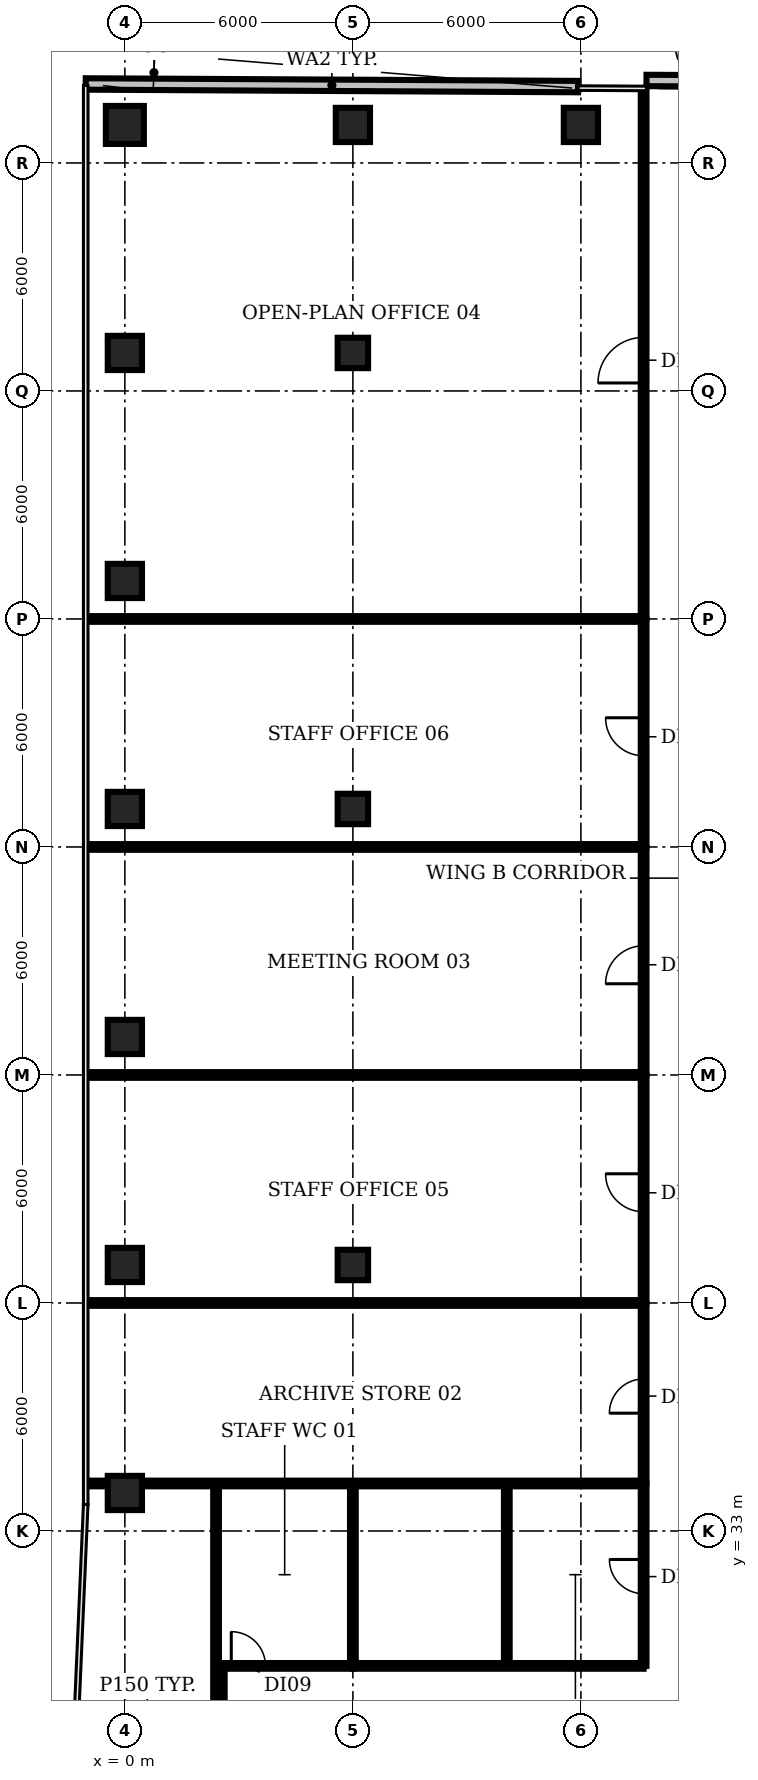
"""IFC4 building model, lengths in metres.
Left out: names, types, materials, properties, quantities, classifications, styles, units other than length and angle.
Written with IfcOpenShell. Run it as: python <this file> out.ifc"""

import sys

from ifc_helpers import new_model, si_unit, direction, frame, frame_2d, origin, origin_2d, place, context, subcontext, project, spatial, rectangle, circle, extrude, element, fill, save


model = new_model("IFC4")
c1 = context("Model", 3, precision=1e-05, world=origin(), true_north=direction((0.0, 1.0)))
c2 = subcontext(c1, "Body", "Model", "MODEL_VIEW")
j1 = project(units=[si_unit("LENGTHUNIT", "METRE"), si_unit("PLANEANGLEUNIT", "RADIAN")], contexts=[c1])
p1 = place(None, origin())
s1 = spatial("IfcSite", under=j1, at=p1, CompositionType="ELEMENT")
p2 = place(p1, origin())
s2 = spatial("IfcBuilding", under=s1, at=p2, CompositionType="ELEMENT")
p3 = place(p2, frame((0.0, 0.0, 121.4)))
s3 = spatial("IfcBuildingStorey", under=s2, at=p3, CompositionType="ELEMENT", Elevation=121.4)
for number, where, z_axis, x_axis in (
    (1, (0.0, 34.0, 0.0), (0.0, 0.0, 1.0), (1.0, 0.0, 0.0)),
    (2, (0.0, 40.0, 0.0), (0.0, 0.0, 1.0), (1.0, 0.0, 0.0)),
    (3, (0.0, 46.0, 0.0), (0.0, 0.0, 1.0), (1.0, 0.0, 0.0)),
    (4, (0.0, 52.0, 0.0), (0.0, 0.0, 1.0), (1.0, 0.0, 0.0)),
    (5, (0.0, 58.0, 0.0), (0.0, 0.0, 1.0), (1.0, 0.0, 0.0)),
    (6, (0.0, 64.0, 0.0), (0.0, 0.0, 1.0), (1.0, 0.0, 0.0)),
):
    element("IfcColumn", number, at=place(p3, frame(where, z_axis=z_axis, x_axis=x_axis)), inside=s3, PredefinedType="COLUMN", context=c2, shape_type="SweptSolid", body=[
        extrude(rectangle(XDim=0.9, YDim=0.9, at=origin_2d()), origin(), (0.0, 0.0, 1.0), 3.85),
    ])
p4 = place(p3, frame((0.0, 70.0, 0.0), z_axis=(0.0, 0.0, 1.0), x_axis=(1.0, 0.0, 0.0)))
e7 = element("IfcColumn", 7, at=p4, inside=s3, PredefinedType="COLUMN", context=c2, shape_type="SweptSolid", body=[
    extrude(circle(Radius=0.5, at=origin_2d()), origin(), (0.0, 0.0, 1.0), 3.85),
])
for number, where, z_axis, x_axis in (
    (8, (6.0, 40.0, 0.0), (0.0, 0.0, 1.0), (1.0, 0.0, 0.0)),
    (9, (6.0, 52.0, 0.0), (0.0, 0.0, 1.0), (1.0, 0.0, 0.0)),
    (10, (6.0, 64.0, 0.0), (0.0, 0.0, 1.0), (1.0, 0.0, 0.0)),
):
    element("IfcColumn", number, at=place(p3, frame(where, z_axis=z_axis, x_axis=x_axis)), inside=s3, PredefinedType="COLUMN", context=c2, shape_type="SweptSolid", body=[
        extrude(rectangle(XDim=0.8, YDim=0.8, at=origin_2d()), origin(), (0.0, 0.0, 1.0), 3.85),
    ])
for number, where, z_axis, x_axis in (
    (11, (6.0, 70.0, 0.0), (0.0, 0.0, 1.0), (1.0, 0.0, 0.0)),
    (12, (12.0, 70.0, 0.0), (0.0, 0.0, 1.0), (1.0, 0.0, 0.0)),
):
    element("IfcColumn", number, at=place(p3, frame(where, z_axis=z_axis, x_axis=x_axis)), inside=s3, PredefinedType="COLUMN", context=c2, shape_type="SweptSolid", body=[
        extrude(rectangle(XDim=0.9, YDim=0.9, at=origin_2d()), origin(), (0.0, 0.0, 1.0), 3.85),
    ])
p5 = place(p3, frame((17.467, 71.15, 0.0), z_axis=(0.0, 0.0, 1.0), x_axis=(-0.999985686998, 0.005350308387, 0.0)))
e13 = element("IfcWall", 13, at=p5, inside=s3, PredefinedType="SOLIDWALL", context=c2, shape_type="SweptSolid", body=[
    extrude(rectangle(XDim=3.742, YDim=0.3, at=frame_2d((1.871, 0.0))), origin(), (0.0, 0.0, 1.0), 3.85),
])
p6 = place(p3, frame((11.925, 71.01, 0.0), z_axis=(0.0, 0.0, 1.0), x_axis=(-0.999985877611, 0.005314562814, 0.0)))
e14 = element("IfcWall", 14, at=p6, inside=s3, PredefinedType="SOLIDWALL", context=c2, shape_type="SweptSolid", body=[
    extrude(rectangle(XDim=12.955, YDim=0.3, at=frame_2d((6.477, 0.0))), origin(), (0.0, 0.0, 1.0), 3.85),
])
for number, where, z_axis, x_axis in (
    (15, (-0.98, 34.25, 0.0), (0.0, 0.0, 1.0), (1.0, 0.0, 0.0)),
    (16, (-0.98, 39.0, 0.0), (0.0, 0.0, 1.0), (1.0, 0.0, 0.0)),
    (17, (-0.98, 45.0, 0.0), (0.0, 0.0, 1.0), (1.0, 0.0, 0.0)),
    (18, (-0.98, 51.0, 0.0), (0.0, 0.0, 1.0), (1.0, 0.0, 0.0)),
    (19, (-0.98, 57.0, 0.0), (0.0, 0.0, 1.0), (1.0, 0.0, 0.0)),
):
    element("IfcWall", number, at=place(p3, frame(where, z_axis=z_axis, x_axis=x_axis)), inside=s3, PredefinedType="PARTITIONING", context=c2, shape_type="SweptSolid", body=[
        extrude(rectangle(XDim=14.63, YDim=0.15, at=frame_2d((7.315, 0.0))), origin(), (0.0, 0.0, 1.0), 2.83),
    ])
p7 = place(p3, frame((2.4, 28.25, 0.0), z_axis=(0.0, 0.0, 1.0), x_axis=(0.0, 1.0, 0.0)))
e20 = element("IfcWall", 20, at=p7, inside=s3, PredefinedType="PARTITIONING", context=c2, shape_type="SweptSolid", body=[
    extrude(rectangle(XDim=6.0, YDim=0.15, at=frame_2d((3.0, 0.0))), origin(), (0.0, 0.0, 1.0), 2.83),
])
p8 = place(p3, frame((2.55, 25.55, 0.0), z_axis=(0.0, 0.0, 1.0), x_axis=(0.0, 1.0, 0.0)))
e21 = element("IfcWall", 21, at=p8, inside=s3, PredefinedType="PARTITIONING", context=c2, shape_type="SweptSolid", body=[
    extrude(rectangle(XDim=3.9, YDim=0.15, at=frame_2d((1.95, 0.0))), origin(), (0.0, 0.0, 1.0), 2.83),
])
p9 = place(p3, frame((2.55, 29.45, 0.0), z_axis=(0.0, 0.0, 1.0), x_axis=(1.0, 0.0, 0.0)))
e22 = element("IfcWall", 22, at=p9, inside=s3, PredefinedType="PARTITIONING", context=c2, shape_type="SweptSolid", body=[
    extrude(rectangle(XDim=3.45, YDim=0.15, at=frame_2d((1.725, 0.0))), origin(), (0.0, 0.0, 1.0), 2.83),
])
p10 = place(p9, frame((0.25, 0.0, 0.0)))
e23 = element("IfcOpeningElement", 23, at=p10, cuts=e22, PredefinedType="OPENING", context=c2, shape_type="SweptSolid", body=[
    extrude(rectangle(XDim=0.9, YDim=2.1, at=frame_2d((0.45, 1.05))), frame((0.0, 0.085, 0.0), z_axis=(0.0, -1.0, 0.0), x_axis=(1.0, 0.0, 0.0)), (0.0, 0.0, 1.0), 0.17),
])
p11 = place(p3, frame((6.0, 29.45, 0.0), z_axis=(0.0, 0.0, 1.0), x_axis=(0.0, 1.0, 0.0)))
e24 = element("IfcWall", 24, at=p11, inside=s3, PredefinedType="PARTITIONING", context=c2, shape_type="SweptSolid", body=[
    extrude(rectangle(XDim=4.8, YDim=0.15, at=frame_2d((2.4, 0.0))), origin(), (0.0, 0.0, 1.0), 2.83),
])
p12 = place(p3, frame((6.0, 29.45, 0.0), z_axis=(0.0, 0.0, 1.0), x_axis=(1.0, 0.0, 0.0)))
e25 = element("IfcWall", 25, at=p12, inside=s3, PredefinedType="PARTITIONING", context=c2, shape_type="SweptSolid", body=[
    extrude(rectangle(XDim=7.65, YDim=0.15, at=frame_2d((3.825, 0.0))), origin(), (0.0, 0.0, 1.0), 2.83),
])
p13 = place(p3, frame((10.05, 29.45, 0.0), z_axis=(0.0, 0.0, 1.0), x_axis=(0.0, 1.0, 0.0)))
e26 = element("IfcWall", 26, at=p13, inside=s3, PredefinedType="PARTITIONING", context=c2, shape_type="SweptSolid", body=[
    extrude(rectangle(XDim=4.8, YDim=0.15, at=frame_2d((2.4, 0.0))), origin(), (0.0, 0.0, 1.0), 2.83),
])
p14 = place(p3, frame((13.65, 29.45, 0.0), z_axis=(0.0, 0.0, 1.0), x_axis=(0.0, 1.0, 0.0)))
e27 = element("IfcWall", 27, at=p14, inside=s3, PredefinedType="PARTITIONING", context=c2, shape_type="SweptSolid", body=[
    extrude(rectangle(XDim=4.8, YDim=0.15, at=frame_2d((2.4, 0.0))), origin(), (0.0, 0.0, 1.0), 2.83),
])
p15 = place(p14, frame((1.9, 0.0, 0.0)))
e28 = element("IfcOpeningElement", 28, at=p15, cuts=e27, PredefinedType="OPENING", context=c2, shape_type="SweptSolid", body=[
    extrude(rectangle(XDim=0.9, YDim=2.1, at=frame_2d((0.45, 1.05))), frame((0.0, 0.085, 0.0), z_axis=(0.0, -1.0, 0.0), x_axis=(1.0, 0.0, 0.0)), (0.0, 0.0, 1.0), 0.17),
])
p16 = place(p3, frame((13.65, 34.25, 0.0), z_axis=(0.0, 0.0, 1.0), x_axis=(0.0, 1.0, 0.0)))
e29 = element("IfcWall", 29, at=p16, inside=s3, PredefinedType="PARTITIONING", context=c2, shape_type="SweptSolid", body=[
    extrude(rectangle(XDim=4.75, YDim=0.15, at=frame_2d((2.375, 0.0))), origin(), (0.0, 0.0, 1.0), 2.83),
])
p17 = place(p16, frame((1.85, 0.0, 0.0)))
e30 = element("IfcOpeningElement", 30, at=p17, cuts=e29, PredefinedType="OPENING", context=c2, shape_type="SweptSolid", body=[
    extrude(rectangle(XDim=0.9, YDim=2.1, at=frame_2d((0.45, 1.05))), frame((0.0, 0.085, 0.0), z_axis=(0.0, -1.0, 0.0), x_axis=(1.0, 0.0, 0.0)), (0.0, 0.0, 1.0), 0.17),
])
p18 = place(p3, frame((13.65, 39.0, 0.0), z_axis=(0.0, 0.0, 1.0), x_axis=(0.0, 1.0, 0.0)))
e31 = element("IfcWall", 31, at=p18, inside=s3, PredefinedType="PARTITIONING", context=c2, shape_type="SweptSolid", body=[
    extrude(rectangle(XDim=6.0, YDim=0.15, at=frame_2d((3.0, 0.0))), origin(), (0.0, 0.0, 1.0), 2.83),
])
p19 = place(p18, frame((2.4, 0.0, 0.0)))
e32 = element("IfcOpeningElement", 32, at=p19, cuts=e31, PredefinedType="OPENING", context=c2, shape_type="SweptSolid", body=[
    extrude(rectangle(XDim=1.0, YDim=2.1, at=frame_2d((0.5, 1.05))), frame((0.0, 0.085, 0.0), z_axis=(0.0, -1.0, 0.0), x_axis=(1.0, 0.0, 0.0)), (0.0, 0.0, 1.0), 0.17),
])
p20 = place(p3, frame((13.65, 45.0, 0.0), z_axis=(0.0, 0.0, 1.0), x_axis=(0.0, 1.0, 0.0)))
e33 = element("IfcWall", 33, at=p20, inside=s3, PredefinedType="PARTITIONING", context=c2, shape_type="SweptSolid", body=[
    extrude(rectangle(XDim=6.0, YDim=0.15, at=frame_2d((3.0, 0.0))), origin(), (0.0, 0.0, 1.0), 2.83),
])
p21 = place(p20, frame((2.4, 0.0, 0.0)))
e34 = element("IfcOpeningElement", 34, at=p21, cuts=e33, PredefinedType="OPENING", context=c2, shape_type="SweptSolid", body=[
    extrude(rectangle(XDim=1.0, YDim=2.1, at=frame_2d((0.5, 1.05))), frame((0.0, 0.085, 0.0), z_axis=(0.0, -1.0, 0.0), x_axis=(1.0, 0.0, 0.0)), (0.0, 0.0, 1.0), 0.17),
])
p22 = place(p3, frame((13.65, 51.0, 0.0), z_axis=(0.0, 0.0, 1.0), x_axis=(0.0, 1.0, 0.0)))
e35 = element("IfcWall", 35, at=p22, inside=s3, PredefinedType="PARTITIONING", context=c2, shape_type="SweptSolid", body=[
    extrude(rectangle(XDim=6.0, YDim=0.15, at=frame_2d((3.0, 0.0))), origin(), (0.0, 0.0, 1.0), 2.83),
])
p23 = place(p22, frame((2.4, 0.0, 0.0)))
e36 = element("IfcOpeningElement", 36, at=p23, cuts=e35, PredefinedType="OPENING", context=c2, shape_type="SweptSolid", body=[
    extrude(rectangle(XDim=1.0, YDim=2.1, at=frame_2d((0.5, 1.05))), frame((0.0, 0.085, 0.0), z_axis=(0.0, -1.0, 0.0), x_axis=(1.0, 0.0, 0.0)), (0.0, 0.0, 1.0), 0.17),
])
p24 = place(p3, frame((13.65, 57.0, 0.0), z_axis=(0.0, 0.0, 1.0), x_axis=(0.0, 1.0, 0.0)))
e37 = element("IfcWall", 37, at=p24, inside=s3, PredefinedType="PARTITIONING", context=c2, shape_type="SweptSolid", body=[
    extrude(rectangle(XDim=13.896, YDim=0.15, at=frame_2d((6.948, 0.0))), origin(), (0.0, 0.0, 1.0), 2.83),
])
p25 = place(p24, frame((6.21, 0.0, 0.0)))
e38 = element("IfcOpeningElement", 38, at=p25, cuts=e37, PredefinedType="OPENING", context=c2, shape_type="SweptSolid", body=[
    extrude(rectangle(XDim=1.2, YDim=2.1, at=frame_2d((0.6, 1.05))), frame((0.0, 0.085, 0.0), z_axis=(0.0, -1.0, 0.0), x_axis=(1.0, 0.0, 0.0)), (0.0, 0.0, 1.0), 0.17),
])
p26 = place(p10, origin())
e39 = element("IfcDoor", 39, at=p26, inside=s3, OperationType="SINGLE_SWING_LEFT", PredefinedType="DOOR", context=c2, shape_type="SweptSolid", body=[
    extrude(rectangle(XDim=0.9, YDim=2.1, at=frame_2d((0.45, 1.05))), frame((0.0, 0.025, 0.0), z_axis=(0.0, -1.0, 0.0), x_axis=(1.0, 0.0, 0.0)), (0.0, 0.0, 1.0), 0.05),
])
fill(e23, e39)
p27 = place(p15, origin())
e40 = element("IfcDoor", 40, at=p27, inside=s3, OperationType="SINGLE_SWING_RIGHT", PredefinedType="DOOR", context=c2, shape_type="SweptSolid", body=[
    extrude(rectangle(XDim=0.9, YDim=2.1, at=frame_2d((0.45, 1.05))), frame((0.0, 0.025, 0.0), z_axis=(0.0, -1.0, 0.0), x_axis=(1.0, 0.0, 0.0)), (0.0, 0.0, 1.0), 0.05),
])
fill(e28, e40)
p28 = place(p17, origin())
e41 = element("IfcDoor", 41, at=p28, inside=s3, OperationType="SINGLE_SWING_LEFT", PredefinedType="DOOR", context=c2, shape_type="SweptSolid", body=[
    extrude(rectangle(XDim=0.9, YDim=2.1, at=frame_2d((0.45, 1.05))), frame((0.0, 0.025, 0.0), z_axis=(0.0, -1.0, 0.0), x_axis=(1.0, 0.0, 0.0)), (0.0, 0.0, 1.0), 0.05),
])
fill(e30, e41)
p29 = place(p19, origin())
e42 = element("IfcDoor", 42, at=p29, inside=s3, OperationType="SINGLE_SWING_RIGHT", PredefinedType="DOOR", context=c2, shape_type="SweptSolid", body=[
    extrude(rectangle(XDim=1.0, YDim=2.1, at=frame_2d((0.5, 1.05))), frame((0.0, 0.025, 0.0), z_axis=(0.0, -1.0, 0.0), x_axis=(1.0, 0.0, 0.0)), (0.0, 0.0, 1.0), 0.05),
])
fill(e32, e42)
p30 = place(p21, origin())
e43 = element("IfcDoor", 43, at=p30, inside=s3, OperationType="SINGLE_SWING_LEFT", PredefinedType="DOOR", context=c2, shape_type="SweptSolid", body=[
    extrude(rectangle(XDim=1.0, YDim=2.1, at=frame_2d((0.5, 1.05))), frame((0.0, 0.025, 0.0), z_axis=(0.0, -1.0, 0.0), x_axis=(1.0, 0.0, 0.0)), (0.0, 0.0, 1.0), 0.05),
])
fill(e34, e43)
p31 = place(p23, origin())
e44 = element("IfcDoor", 44, at=p31, inside=s3, OperationType="SINGLE_SWING_RIGHT", PredefinedType="DOOR", context=c2, shape_type="SweptSolid", body=[
    extrude(rectangle(XDim=1.0, YDim=2.1, at=frame_2d((0.5, 1.05))), frame((0.0, 0.025, 0.0), z_axis=(0.0, -1.0, 0.0), x_axis=(1.0, 0.0, 0.0)), (0.0, 0.0, 1.0), 0.05),
])
fill(e36, e44)
p32 = place(p25, origin())
e45 = element("IfcDoor", 45, at=p32, inside=s3, OperationType="SINGLE_SWING_LEFT", PredefinedType="DOOR", context=c2, shape_type="SweptSolid", body=[
    extrude(rectangle(XDim=1.2, YDim=2.1, at=frame_2d((0.6, 1.05))), frame((0.0, 0.025, 0.0), z_axis=(0.0, -1.0, 0.0), x_axis=(1.0, 0.0, 0.0)), (0.0, 0.0, 1.0), 0.05),
])
fill(e38, e45)
save(model, sys.argv[1])
